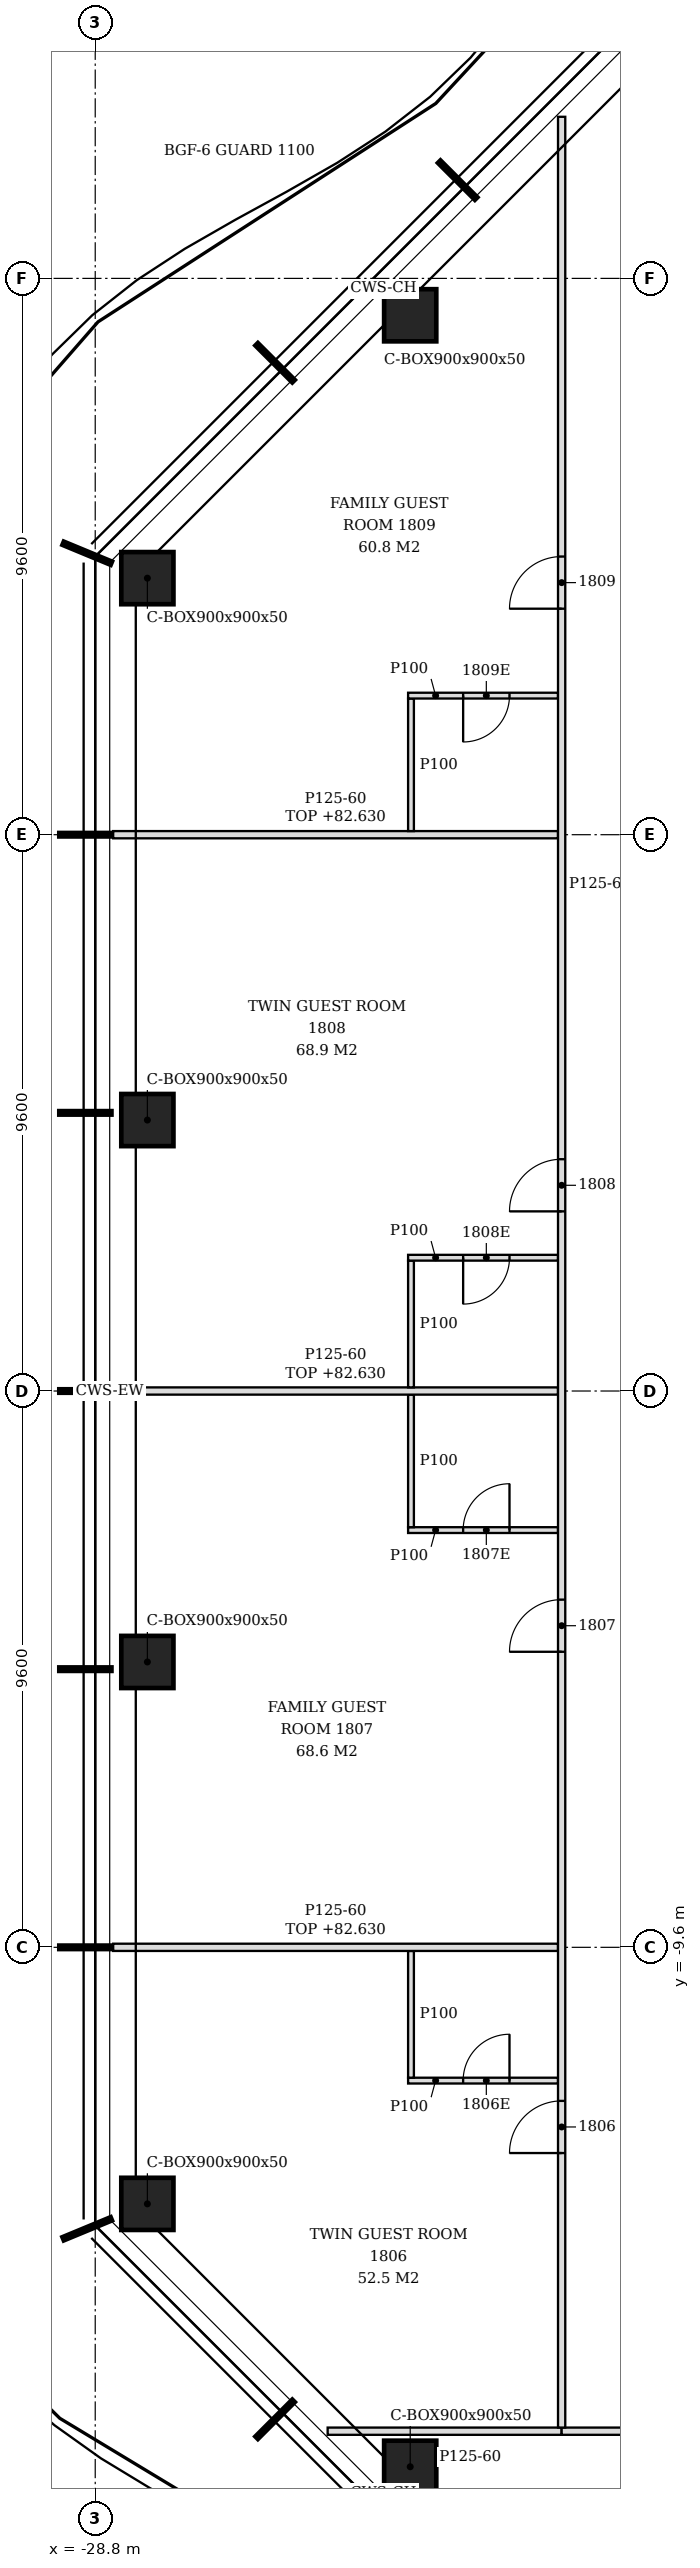
"""IFC4 building model, lengths in metres.
Left out: names, types, materials, properties, quantities, classifications, styles, units other than length and angle.
Written with IfcOpenShell. Run it as: python <this file> out.ifc"""

import sys

from ifc_helpers import new_model, si_unit, direction, frame, frame_2d, origin, origin_2d, place, context, subcontext, project, spatial, polyline, rectangle, hollow_rectangle, outline, extrude, element, fill, save


model = new_model("IFC4")
c1 = context("Model", 3, precision=1e-05, world=origin(), true_north=direction((0.0, 1.0)))
c2 = subcontext(c1, "Body", "Model", "MODEL_VIEW")
j1 = project(units=[si_unit("LENGTHUNIT", "METRE"), si_unit("PLANEANGLEUNIT", "RADIAN")], contexts=[c1])
p1 = place(None, origin())
s1 = spatial("IfcSite", under=j1, at=p1, CompositionType="ELEMENT")
p2 = place(p1, origin())
s2 = spatial("IfcBuilding", under=s1, at=p2, CompositionType="ELEMENT")
p3 = place(p2, frame((0.0, 0.0, 79.8)))
s3 = spatial("IfcBuildingStorey", under=s2, at=p3, CompositionType="ELEMENT", Elevation=79.8)
for number, where, z_axis, x_axis in (
    (1, (-23.364, 18.564, -0.15), (0.0, 0.0, 1.0), (1.0, 0.0, 0.0)),
    (2, (-27.9, 14.027, -0.15), (0.0, 0.0, 1.0), (1.0, 0.0, 0.0)),
    (3, (-27.9, 4.676, -0.15), (0.0, 0.0, 1.0), (1.0, 0.0, 0.0)),
    (4, (-27.9, -4.676, -0.15), (0.0, 0.0, 1.0), (1.0, 0.0, 0.0)),
    (5, (-27.9, -14.027, -0.15), (0.0, 0.0, 1.0), (1.0, 0.0, 0.0)),
    (6, (-23.364, -18.564, -0.15), (0.0, 0.0, 1.0), (1.0, 0.0, 0.0)),
):
    element("IfcColumn", number, at=place(p3, frame(where, z_axis=z_axis, x_axis=x_axis)), inside=s3, PredefinedType="COLUMN", context=c2, shape_type="SweptSolid", body=[
        extrude(hollow_rectangle(XDim=0.9, YDim=0.9, WallThickness=0.05, at=origin_2d()), origin(), (0.0, 0.0, 1.0), 3.6),
    ])
p4 = place(p3, frame((-24.789, -17.95, 0.0), z_axis=(0.0, 0.0, 1.0), x_axis=(1.0, 0.0, 0.0)))
e7 = element("IfcWall", 7, at=p4, inside=s3, PredefinedType="PARTITIONING", context=c2, shape_type="SweptSolid", body=[
    extrude(outline(polyline([(0.0, 0.0), (4.039, 0.0), (4.039, 3.45), (1.086, 3.45), (1.084, 2.93), (0.537, 2.93), (0.535, 3.45), (0.0, 3.45), (0.0, 0.0)])), frame((0.0, 0.062, 0.0), z_axis=(0.0, -1.0, 0.0), x_axis=(1.0, 0.0, 0.0)), (0.0, 0.0, 1.0), 0.125),
])
p5 = place(p3, frame((-20.75, -17.95, 0.0), z_axis=(0.0, 0.0, 1.0), x_axis=(1.0, 0.0, 0.0)))
e8 = element("IfcWall", 8, at=p5, inside=s3, PredefinedType="PARTITIONING", context=c2, shape_type="SweptSolid", body=[
    extrude(outline(polyline([(0.0, 0.0), (39.887, 0.0), (39.887, 2.73), (39.8, 2.73), (39.798, 3.45), (28.1, 3.45), (28.098, 2.73), (27.8, 2.73), (27.798, 3.45), (16.1, 3.45), (16.098, 2.73), (15.8, 2.73), (15.798, 3.45), (6.5, 3.45), (6.498, 2.93), (6.2, 2.93), (6.198, 3.45), (0.0, 3.45), (0.0, 0.0)])), frame((0.0, 0.062, 0.0), z_axis=(0.0, -1.0, 0.0), x_axis=(1.0, 0.0, 0.0)), (0.0, 0.0, 1.0), 0.125),
])
p6 = place(p5, frame((5.15, 0.0, 0.0)))
e9 = element("IfcOpeningElement", 9, at=p6, cuts=e8, PredefinedType="OPENING", context=c2, shape_type="SweptSolid", body=[
    extrude(rectangle(XDim=0.9, YDim=2.1, at=frame_2d((0.45, 1.05))), frame((0.0, 0.073, 0.0), z_axis=(0.0, -1.0, 0.0), x_axis=(1.0, 0.0, 0.0)), (0.0, 0.0, 1.0), 0.145),
])
p7 = place(p5, frame((14.75, 0.0, 0.0)))
e10 = element("IfcOpeningElement", 10, at=p7, cuts=e8, PredefinedType="OPENING", context=c2, shape_type="SweptSolid", body=[
    extrude(rectangle(XDim=0.9, YDim=2.1, at=frame_2d((0.45, 1.05))), frame((0.0, 0.073, 0.0), z_axis=(0.0, -1.0, 0.0), x_axis=(1.0, 0.0, 0.0)), (0.0, 0.0, 1.0), 0.145),
])
p8 = place(p5, frame((24.35, 0.0, 0.0)))
e11 = element("IfcOpeningElement", 11, at=p8, cuts=e8, PredefinedType="OPENING", context=c2, shape_type="SweptSolid", body=[
    extrude(rectangle(XDim=0.9, YDim=2.1, at=frame_2d((0.45, 1.05))), frame((0.0, 0.073, 0.0), z_axis=(0.0, -1.0, 0.0), x_axis=(1.0, 0.0, 0.0)), (0.0, 0.0, 1.0), 0.145),
])
p9 = place(p5, frame((29.75, 0.0, 0.0)))
e12 = element("IfcOpeningElement", 12, at=p9, cuts=e8, PredefinedType="OPENING", context=c2, shape_type="SweptSolid", body=[
    extrude(rectangle(XDim=0.9, YDim=2.1, at=frame_2d((0.45, 1.05))), frame((0.0, 0.073, 0.0), z_axis=(0.0, -1.0, 0.0), x_axis=(1.0, 0.0, 0.0)), (0.0, 0.0, 1.0), 0.145),
])
p10 = place(p5, frame((35.45, 0.0, 0.0)))
e13 = element("IfcOpeningElement", 13, at=p10, cuts=e8, PredefinedType="OPENING", context=c2, shape_type="SweptSolid", body=[
    extrude(rectangle(XDim=0.9, YDim=2.1, at=frame_2d((0.45, 1.05))), frame((0.0, 0.073, 0.0), z_axis=(0.0, -1.0, 0.0), x_axis=(1.0, 0.0, 0.0)), (0.0, 0.0, 1.0), 0.145),
])
p11 = place(p3, frame((-20.75, -17.887, 0.0), z_axis=(0.0, 0.0, 1.0), x_axis=(0.0, 1.0, 0.0)))
e14 = element("IfcWall", 14, at=p11, inside=s3, PredefinedType="PARTITIONING", context=c2, shape_type="SweptSolid", body=[
    extrude(outline(polyline([(0.0, 0.0), (39.876, 0.0), (39.876, 3.45), (39.622, 3.45), (39.62, 2.63), (38.507, 2.63), (38.505, 3.45), (37.183, 3.45), (37.18, 2.98), (36.992, 2.98), (36.99, 3.45), (32.397, 3.45), (32.396, 2.83), (32.177, 2.83), (32.176, 3.45), (27.597, 3.45), (27.595, 2.83), (27.377, 2.83), (27.375, 3.45), (22.798, 3.45), (22.795, 2.83), (22.577, 2.83), (22.575, 3.45), (17.998, 3.45), (17.996, 2.83), (17.778, 2.83), (17.775, 3.45), (13.198, 3.45), (13.196, 2.83), (12.978, 2.83), (12.976, 3.45), (8.397, 3.45), (8.396, 2.83), (8.177, 2.83), (8.176, 3.45), (3.597, 3.45), (3.595, 2.83), (3.377, 2.83), (3.375, 3.45), (0.0, 3.45), (0.0, 0.0)])), frame((0.0, 0.062, 0.0), z_axis=(0.0, -1.0, 0.0), x_axis=(1.0, 0.0, 0.0)), (0.0, 0.0, 1.0), 0.125),
])
p12 = place(p11, frame((4.738, 0.0, 0.0)))
e15 = element("IfcOpeningElement", 15, at=p12, cuts=e14, PredefinedType="OPENING", context=c2, shape_type="SweptSolid", body=[
    extrude(rectangle(XDim=0.9, YDim=2.1, at=frame_2d((0.45, 1.05))), frame((0.0, 0.073, 0.0), z_axis=(0.0, -1.0, 0.0), x_axis=(1.0, 0.0, 0.0)), (0.0, 0.0, 1.0), 0.145),
])
p13 = place(p11, frame((13.387, 0.0, 0.0)))
e16 = element("IfcOpeningElement", 16, at=p13, cuts=e14, PredefinedType="OPENING", context=c2, shape_type="SweptSolid", body=[
    extrude(rectangle(XDim=0.9, YDim=2.1, at=frame_2d((0.45, 1.05))), frame((0.0, 0.073, 0.0), z_axis=(0.0, -1.0, 0.0), x_axis=(1.0, 0.0, 0.0)), (0.0, 0.0, 1.0), 0.145),
])
p14 = place(p11, frame((20.988, 0.0, 0.0)))
e17 = element("IfcOpeningElement", 17, at=p14, cuts=e14, PredefinedType="OPENING", context=c2, shape_type="SweptSolid", body=[
    extrude(rectangle(XDim=0.9, YDim=2.1, at=frame_2d((0.45, 1.05))), frame((0.0, 0.073, 0.0), z_axis=(0.0, -1.0, 0.0), x_axis=(1.0, 0.0, 0.0)), (0.0, 0.0, 1.0), 0.145),
])
p15 = place(p11, frame((31.387, 0.0, 0.0)))
e18 = element("IfcOpeningElement", 18, at=p15, cuts=e14, PredefinedType="OPENING", context=c2, shape_type="SweptSolid", body=[
    extrude(rectangle(XDim=0.9, YDim=2.1, at=frame_2d((0.45, 1.05))), frame((0.0, 0.073, 0.0), z_axis=(0.0, -1.0, 0.0), x_axis=(1.0, 0.0, 0.0)), (0.0, 0.0, 1.0), 0.145),
])
p16 = place(p3, frame((-23.4, -11.9, 0.0), z_axis=(0.0, 0.0, 1.0), x_axis=(1.0, 0.0, 0.0)))
e19 = element("IfcWall", 19, at=p16, inside=s3, PredefinedType="PARTITIONING", context=c2, shape_type="SweptSolid", body=[
    extrude(rectangle(XDim=2.587, YDim=0.1, at=frame_2d((1.294, 0.0))), origin(), (0.0, 0.0, 1.0), 3.45),
])
p17 = place(p16, frame((0.95, 0.0, 0.0)))
e20 = element("IfcOpeningElement", 20, at=p17, cuts=e19, PredefinedType="OPENING", context=c2, shape_type="SweptSolid", body=[
    extrude(rectangle(XDim=0.8, YDim=2.1, at=frame_2d((0.4, 1.05))), frame((0.0, 0.06, 0.0), z_axis=(0.0, -1.0, 0.0), x_axis=(1.0, 0.0, 0.0)), (0.0, 0.0, 1.0), 0.12),
])
p18 = place(p3, frame((-23.35, -11.85, 0.0), z_axis=(0.0, 0.0, 1.0), x_axis=(0.0, 1.0, 0.0)))
e21 = element("IfcWall", 21, at=p18, inside=s3, PredefinedType="PARTITIONING", context=c2, shape_type="SweptSolid", body=[
    extrude(outline(polyline([(0.0, 0.0), (2.188, 0.0), (2.188, 2.83), (2.14, 2.83), (2.138, 3.45), (0.0, 3.45), (0.0, 0.0)])), frame((0.0, 0.05, 0.0), z_axis=(0.0, -1.0, 0.0), x_axis=(1.0, 0.0, 0.0)), (0.0, 0.0, 1.0), 0.1),
])
p19 = place(p3, frame((-28.49, -9.6, 0.0), z_axis=(0.0, 0.0, 1.0), x_axis=(1.0, 0.0, 0.0)))
e22 = element("IfcWall", 22, at=p19, inside=s3, PredefinedType="PARTITIONING", context=c2, shape_type="SweptSolid", body=[
    extrude(rectangle(XDim=7.677, YDim=0.125, at=frame_2d((3.839, 0.0))), origin(), (0.0, 0.0, 1.0), 2.83),
])
p20 = place(p3, frame((-23.4, -2.4, 0.0), z_axis=(0.0, 0.0, 1.0), x_axis=(1.0, 0.0, 0.0)))
e23 = element("IfcWall", 23, at=p20, inside=s3, PredefinedType="PARTITIONING", context=c2, shape_type="SweptSolid", body=[
    extrude(rectangle(XDim=2.587, YDim=0.1, at=frame_2d((1.294, 0.0))), origin(), (0.0, 0.0, 1.0), 3.45),
])
p21 = place(p20, frame((0.95, 0.0, 0.0)))
e24 = element("IfcOpeningElement", 24, at=p21, cuts=e23, PredefinedType="OPENING", context=c2, shape_type="SweptSolid", body=[
    extrude(rectangle(XDim=0.8, YDim=2.1, at=frame_2d((0.4, 1.05))), frame((0.0, 0.06, 0.0), z_axis=(0.0, -1.0, 0.0), x_axis=(1.0, 0.0, 0.0)), (0.0, 0.0, 1.0), 0.12),
])
p22 = place(p3, frame((-23.35, -2.35, 0.0), z_axis=(0.0, 0.0, 1.0), x_axis=(0.0, 1.0, 0.0)))
e25 = element("IfcWall", 25, at=p22, inside=s3, PredefinedType="PARTITIONING", context=c2, shape_type="SweptSolid", body=[
    extrude(outline(polyline([(0.0, 0.0), (2.288, 0.0), (2.288, 2.83), (2.24, 2.83), (2.238, 3.45), (0.0, 3.45), (0.0, 0.0)])), frame((0.0, 0.05, 0.0), z_axis=(0.0, -1.0, 0.0), x_axis=(1.0, 0.0, 0.0)), (0.0, 0.0, 1.0), 0.1),
])
p23 = place(p3, frame((-28.49, 0.0, 0.0), z_axis=(0.0, 0.0, 1.0), x_axis=(1.0, 0.0, 0.0)))
e26 = element("IfcWall", 26, at=p23, inside=s3, PredefinedType="PARTITIONING", context=c2, shape_type="SweptSolid", body=[
    extrude(rectangle(XDim=7.677, YDim=0.125, at=frame_2d((3.839, 0.0))), origin(), (0.0, 0.0, 1.0), 2.83),
])
p24 = place(p3, frame((-23.35, 0.062, 0.0), z_axis=(0.0, 0.0, 1.0), x_axis=(0.0, 1.0, 0.0)))
e27 = element("IfcWall", 27, at=p24, inside=s3, PredefinedType="PARTITIONING", context=c2, shape_type="SweptSolid", body=[
    extrude(outline(polyline([(0.0, 0.0), (2.188, 0.0), (2.188, 3.45), (0.048, 3.45), (0.045, 2.83), (0.0, 2.83), (0.0, 0.0)])), frame((0.0, 0.05, 0.0), z_axis=(0.0, -1.0, 0.0), x_axis=(1.0, 0.0, 0.0)), (0.0, 0.0, 1.0), 0.1),
])
p25 = place(p3, frame((-23.4, 2.3, 0.0), z_axis=(0.0, 0.0, 1.0), x_axis=(1.0, 0.0, 0.0)))
e28 = element("IfcWall", 28, at=p25, inside=s3, PredefinedType="PARTITIONING", context=c2, shape_type="SweptSolid", body=[
    extrude(rectangle(XDim=2.587, YDim=0.1, at=frame_2d((1.294, 0.0))), origin(), (0.0, 0.0, 1.0), 3.45),
])
p26 = place(p25, frame((0.95, 0.0, 0.0)))
e29 = element("IfcOpeningElement", 29, at=p26, cuts=e28, PredefinedType="OPENING", context=c2, shape_type="SweptSolid", body=[
    extrude(rectangle(XDim=0.8, YDim=2.1, at=frame_2d((0.4, 1.05))), frame((0.0, 0.06, 0.0), z_axis=(0.0, -1.0, 0.0), x_axis=(1.0, 0.0, 0.0)), (0.0, 0.0, 1.0), 0.12),
])
p27 = place(p3, frame((-28.49, 9.6, 0.0), z_axis=(0.0, 0.0, 1.0), x_axis=(1.0, 0.0, 0.0)))
e30 = element("IfcWall", 30, at=p27, inside=s3, PredefinedType="PARTITIONING", context=c2, shape_type="SweptSolid", body=[
    extrude(rectangle(XDim=7.677, YDim=0.125, at=frame_2d((3.839, 0.0))), origin(), (0.0, 0.0, 1.0), 2.83),
])
p28 = place(p3, frame((-23.35, 9.663, 0.0), z_axis=(0.0, 0.0, 1.0), x_axis=(0.0, 1.0, 0.0)))
e31 = element("IfcWall", 31, at=p28, inside=s3, PredefinedType="PARTITIONING", context=c2, shape_type="SweptSolid", body=[
    extrude(outline(polyline([(0.0, 0.0), (2.287, 0.0), (2.288, 3.45), (0.048, 3.45), (0.045, 2.83), (0.0, 2.83), (0.0, 0.0)])), frame((0.0, 0.05, 0.0), z_axis=(0.0, -1.0, 0.0), x_axis=(1.0, 0.0, 0.0)), (0.0, 0.0, 1.0), 0.1),
])
p29 = place(p3, frame((-23.4, 12.0, 0.0), z_axis=(0.0, 0.0, 1.0), x_axis=(1.0, 0.0, 0.0)))
e32 = element("IfcWall", 32, at=p29, inside=s3, PredefinedType="PARTITIONING", context=c2, shape_type="SweptSolid", body=[
    extrude(rectangle(XDim=2.587, YDim=0.1, at=frame_2d((1.294, 0.0))), origin(), (0.0, 0.0, 1.0), 3.45),
])
p30 = place(p29, frame((0.95, 0.0, 0.0)))
e33 = element("IfcOpeningElement", 33, at=p30, cuts=e32, PredefinedType="OPENING", context=c2, shape_type="SweptSolid", body=[
    extrude(rectangle(XDim=0.8, YDim=2.1, at=frame_2d((0.4, 1.05))), frame((0.0, 0.06, 0.0), z_axis=(0.0, -1.0, 0.0), x_axis=(1.0, 0.0, 0.0)), (0.0, 0.0, 1.0), 0.12),
])
p31 = place(p12, origin())
e34 = element("IfcDoor", 34, at=p31, inside=s3, OperationType="SINGLE_SWING_LEFT", PredefinedType="DOOR", context=c2, shape_type="SweptSolid", body=[
    extrude(rectangle(XDim=0.9, YDim=2.1, at=frame_2d((0.45, 1.05))), frame((0.0, 0.025, 0.0), z_axis=(0.0, -1.0, 0.0), x_axis=(1.0, 0.0, 0.0)), (0.0, 0.0, 1.0), 0.05),
])
fill(e15, e34)
p32 = place(p17, origin())
e35 = element("IfcDoor", 35, at=p32, inside=s3, OperationType="SINGLE_SWING_RIGHT", PredefinedType="DOOR", context=c2, shape_type="SweptSolid", body=[
    extrude(rectangle(XDim=0.8, YDim=2.1, at=frame_2d((0.4, 1.05))), frame((0.0, 0.025, 0.0), z_axis=(0.0, -1.0, 0.0), x_axis=(1.0, 0.0, 0.0)), (0.0, 0.0, 1.0), 0.05),
])
fill(e20, e35)
p33 = place(p13, origin())
e36 = element("IfcDoor", 36, at=p33, inside=s3, OperationType="SINGLE_SWING_LEFT", PredefinedType="DOOR", context=c2, shape_type="SweptSolid", body=[
    extrude(rectangle(XDim=0.9, YDim=2.1, at=frame_2d((0.45, 1.05))), frame((0.0, 0.025, 0.0), z_axis=(0.0, -1.0, 0.0), x_axis=(1.0, 0.0, 0.0)), (0.0, 0.0, 1.0), 0.05),
])
fill(e16, e36)
p34 = place(p21, origin())
e37 = element("IfcDoor", 37, at=p34, inside=s3, OperationType="SINGLE_SWING_RIGHT", PredefinedType="DOOR", context=c2, shape_type="SweptSolid", body=[
    extrude(rectangle(XDim=0.8, YDim=2.1, at=frame_2d((0.4, 1.05))), frame((0.0, 0.025, 0.0), z_axis=(0.0, -1.0, 0.0), x_axis=(1.0, 0.0, 0.0)), (0.0, 0.0, 1.0), 0.05),
])
fill(e24, e37)
p35 = place(p14, origin())
e38 = element("IfcDoor", 38, at=p35, inside=s3, OperationType="SINGLE_SWING_LEFT", PredefinedType="DOOR", context=c2, shape_type="SweptSolid", body=[
    extrude(rectangle(XDim=0.9, YDim=2.1, at=frame_2d((0.45, 1.05))), frame((0.0, 0.025, 0.0), z_axis=(0.0, -1.0, 0.0), x_axis=(1.0, 0.0, 0.0)), (0.0, 0.0, 1.0), 0.05),
])
fill(e17, e38)
p36 = place(p26, frame((0.8, 0.0, 0.0), z_axis=(0.0, 0.0, 1.0), x_axis=(-1.0, 0.0, 0.0)))
e39 = element("IfcDoor", 39, at=p36, inside=s3, OperationType="SINGLE_SWING_RIGHT", PredefinedType="DOOR", context=c2, shape_type="SweptSolid", body=[
    extrude(rectangle(XDim=0.8, YDim=2.1, at=frame_2d((0.4, 1.05))), frame((0.0, 0.025, 0.0), z_axis=(0.0, -1.0, 0.0), x_axis=(1.0, 0.0, 0.0)), (0.0, 0.0, 1.0), 0.05),
])
fill(e29, e39)
p37 = place(p15, origin())
e40 = element("IfcDoor", 40, at=p37, inside=s3, OperationType="SINGLE_SWING_LEFT", PredefinedType="DOOR", context=c2, shape_type="SweptSolid", body=[
    extrude(rectangle(XDim=0.9, YDim=2.1, at=frame_2d((0.45, 1.05))), frame((0.0, 0.025, 0.0), z_axis=(0.0, -1.0, 0.0), x_axis=(1.0, 0.0, 0.0)), (0.0, 0.0, 1.0), 0.05),
])
fill(e18, e40)
p38 = place(p30, frame((0.8, 0.0, 0.0), z_axis=(0.0, 0.0, 1.0), x_axis=(-1.0, 0.0, 0.0)))
e41 = element("IfcDoor", 41, at=p38, inside=s3, OperationType="SINGLE_SWING_RIGHT", PredefinedType="DOOR", context=c2, shape_type="SweptSolid", body=[
    extrude(rectangle(XDim=0.8, YDim=2.1, at=frame_2d((0.4, 1.05))), frame((0.0, 0.025, 0.0), z_axis=(0.0, -1.0, 0.0), x_axis=(1.0, 0.0, 0.0)), (0.0, 0.0, 1.0), 0.05),
])
fill(e33, e41)
save(model, sys.argv[1])
